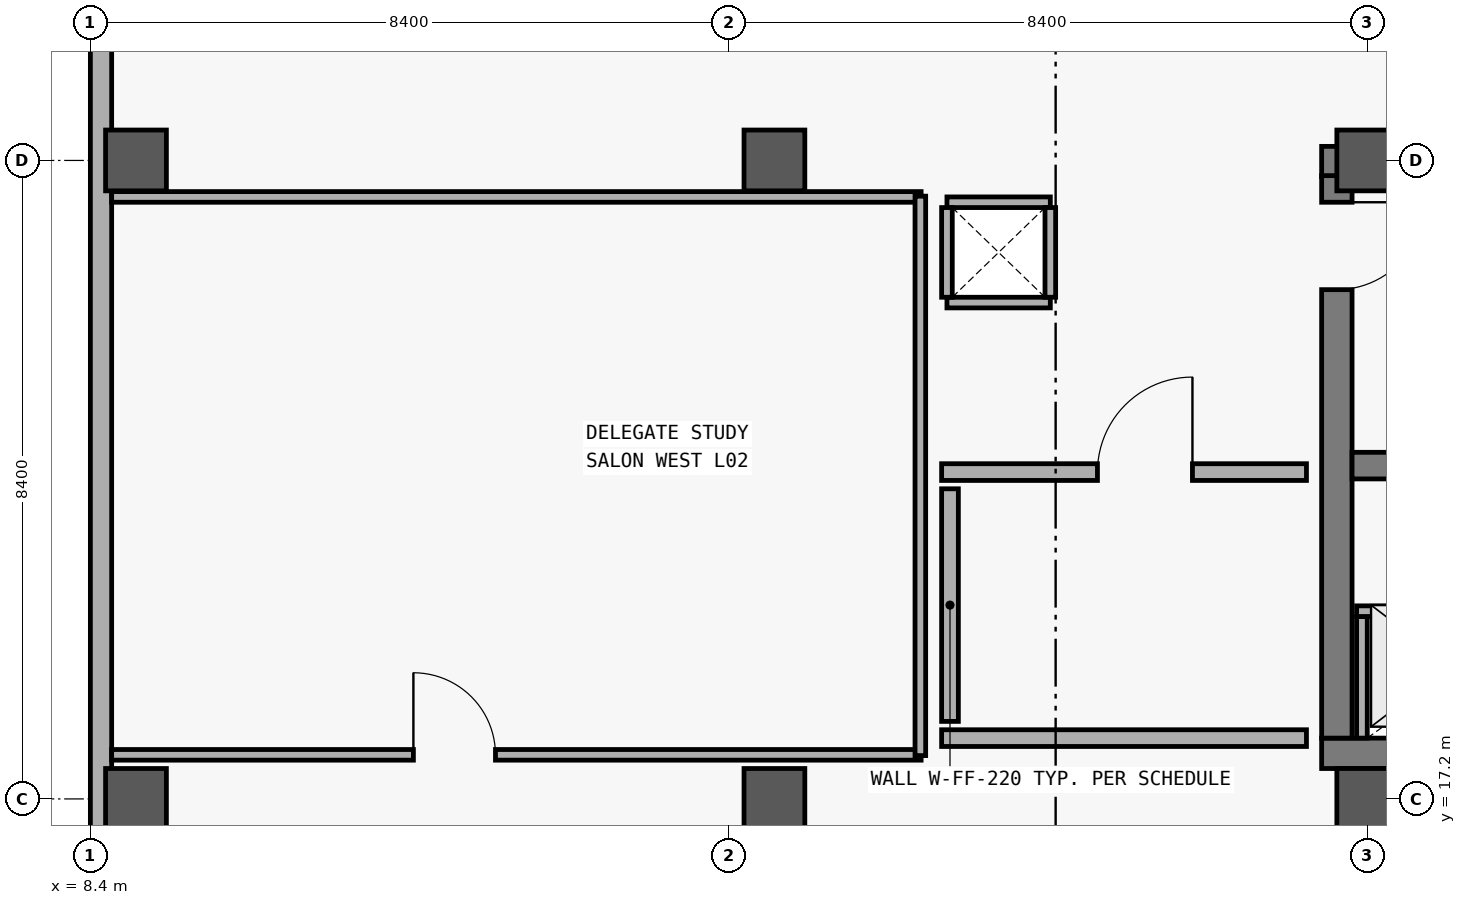
"""IFC4 building model, lengths in metres.
Left out: names, types, materials, properties, quantities, classifications, styles, units other than length and angle.
Written with IfcOpenShell. Run it as: python <this file> out.ifc"""

import sys

from ifc_helpers import new_model, si_unit, direction, frame, frame_2d, origin, origin_2d, place, context, subcontext, project, spatial, rectangle, extrude, element, fill, save


model = new_model("IFC4")
c1 = context("Model", 3, precision=1e-05, world=origin(), true_north=direction((0.0, 1.0)))
c2 = subcontext(c1, "Body", "Model", "MODEL_VIEW")
j1 = project(units=[si_unit("LENGTHUNIT", "METRE"), si_unit("PLANEANGLEUNIT", "RADIAN")], contexts=[c1])
p1 = place(None, origin())
s1 = spatial("IfcSite", under=j1, at=p1, CompositionType="ELEMENT")
p2 = place(p1, origin())
s2 = spatial("IfcBuilding", under=s1, at=p2, CompositionType="ELEMENT")
p3 = place(p2, frame((0.0, 0.0, 10.8)))
s3 = spatial("IfcBuildingStorey", under=s2, at=p3, CompositionType="ELEMENT", Elevation=10.8)
for number, where, z_axis, x_axis in (
    (1, (9.0, 17.2, 0.0), (0.0, 0.0, 1.0), (1.0, 0.0, 0.0)),
    (2, (9.0, 25.6, 0.0), (0.0, 0.0, 1.0), (1.0, 0.0, 0.0)),
    (3, (17.4, 17.2, 0.0), (0.0, 0.0, 1.0), (1.0, 0.0, 0.0)),
    (4, (17.4, 25.6, 0.0), (0.0, 0.0, 1.0), (1.0, 0.0, 0.0)),
    (5, (25.2, 17.2, 0.0), (0.0, 0.0, 1.0), (1.0, 0.0, 0.0)),
    (6, (25.2, 25.6, 0.0), (0.0, 0.0, 1.0), (1.0, 0.0, 0.0)),
):
    element("IfcColumn", number, at=place(p3, frame(where, z_axis=z_axis, x_axis=x_axis)), inside=s3, PredefinedType="COLUMN", context=c2, shape_type="SweptSolid", body=[
        extrude(rectangle(XDim=0.8, YDim=0.8, at=origin_2d()), origin(), (0.0, 0.0, 1.0), 4.2),
    ])
p4 = place(p3, frame((8.54, 6.0, 0.0), z_axis=(0.0, 0.0, 1.0), x_axis=(0.0, 1.0, 0.0)))
e7 = element("IfcWall", 7, at=p4, inside=s3, PredefinedType="SOLIDWALL", context=c2, shape_type="SweptSolid", body=[
    extrude(rectangle(XDim=28.0, YDim=0.28, at=frame_2d((14.0, 0.0))), origin(), (0.0, 0.0, 1.0), 3.92),
])
p5 = place(p4, frame((4.5, 0.0, 0.95)))
e8 = element("IfcOpeningElement", 8, at=p5, cuts=e7, PredefinedType="OPENING", context=c2, shape_type="SweptSolid", body=[
    extrude(rectangle(XDim=1.6, YDim=1.6, at=frame_2d((0.8, 0.8))), frame((0.0, 0.15, 0.0), z_axis=(0.0, -1.0, 0.0), x_axis=(1.0, 0.0, 0.0)), (0.0, 0.0, 1.0), 0.3),
])
p6 = place(p3, frame((24.6, 17.8, 0.0), z_axis=(0.0, 0.0, 1.0), x_axis=(1.0, 0.0, 0.0)))
e9 = element("IfcWall", 9, at=p6, inside=s3, PredefinedType="SHEAR", context=c2, shape_type="SweptSolid", body=[
    extrude(rectangle(XDim=9.2, YDim=0.4, at=frame_2d((4.6, 0.0))), origin(), (0.0, 0.0, 1.0), 3.92),
])
p7 = place(p6, frame((1.1, 0.0, 0.0)))
e10 = element("IfcOpeningElement", 10, at=p7, cuts=e9, PredefinedType="OPENING", context=c2, shape_type="SweptSolid", body=[
    extrude(rectangle(XDim=1.2, YDim=2.2, at=frame_2d((0.6, 1.1))), frame((0.0, 0.21, 0.0), z_axis=(0.0, -1.0, 0.0), x_axis=(1.0, 0.0, 0.0)), (0.0, 0.0, 1.0), 0.42),
])
p8 = place(p6, frame((3.5, 0.0, 0.0)))
e11 = element("IfcOpeningElement", 11, at=p8, cuts=e9, PredefinedType="OPENING", context=c2, shape_type="SweptSolid", body=[
    extrude(rectangle(XDim=1.1, YDim=2.2, at=frame_2d((0.55, 1.1))), frame((0.0, 0.21, 0.0), z_axis=(0.0, -1.0, 0.0), x_axis=(1.0, 0.0, 0.0)), (0.0, 0.0, 1.0), 0.42),
])
p9 = place(p6, frame((5.9, 0.0, 0.0)))
e12 = element("IfcOpeningElement", 12, at=p9, cuts=e9, PredefinedType="OPENING", context=c2, shape_type="SweptSolid", body=[
    extrude(rectangle(XDim=1.1, YDim=2.2, at=frame_2d((0.55, 1.1))), frame((0.0, 0.21, 0.0), z_axis=(0.0, -1.0, 0.0), x_axis=(1.0, 0.0, 0.0)), (0.0, 0.0, 1.0), 0.42),
])
p10 = place(p3, frame((33.8, 25.585, 0.0), z_axis=(0.0, 0.0, 1.0), x_axis=(-1.0, 0.0, 0.0)))
e13 = element("IfcWall", 13, at=p10, inside=s3, PredefinedType="SHEAR", context=c2, shape_type="SweptSolid", body=[
    extrude(rectangle(XDim=9.2, YDim=0.4, at=frame_2d((4.6, 0.0))), origin(), (0.0, 0.0, 1.0), 3.92),
])
p11 = place(p3, frame((24.8, 25.4, 0.0), z_axis=(0.0, 0.0, 1.0), x_axis=(0.0, -1.0, 0.0)))
e14 = element("IfcWall", 14, at=p11, inside=s3, PredefinedType="SHEAR", context=c2, shape_type="SweptSolid", body=[
    extrude(rectangle(XDim=7.4, YDim=0.4, at=frame_2d((3.7, 0.0))), origin(), (0.0, 0.0, 1.0), 3.92),
])
p12 = place(p11, frame((0.35, 0.0, 0.0)))
e15 = element("IfcOpeningElement", 15, at=p12, cuts=e14, PredefinedType="OPENING", context=c2, shape_type="SweptSolid", body=[
    extrude(rectangle(XDim=1.15, YDim=2.2, at=frame_2d((0.575, 1.1))), frame((0.0, 0.21, 0.0), z_axis=(0.0, -1.0, 0.0), x_axis=(1.0, 0.0, 0.0)), (0.0, 0.0, 1.0), 0.42),
])
p13 = place(p3, frame((25.0, 21.585, 0.0), z_axis=(0.0, 0.0, 1.0), x_axis=(1.0, 0.0, 0.0)))
e16 = element("IfcWall", 16, at=p13, inside=s3, PredefinedType="SHEAR", context=c2, shape_type="SweptSolid", body=[
    extrude(rectangle(XDim=8.4, YDim=0.35, at=frame_2d((4.2, 0.0))), origin(), (0.0, 0.0, 1.0), 3.92),
])
p14 = place(p3, frame((25.13, 18.0, 0.0), z_axis=(0.0, 0.0, 1.0), x_axis=(0.0, 1.0, 0.0)))
e17 = element("IfcWall", 17, at=p14, inside=s3, PredefinedType="PARTITIONING", context=c2, shape_type="SweptSolid", body=[
    extrude(rectangle(XDim=1.6, YDim=0.14, at=frame_2d((0.8, 0.0))), origin(), (0.0, 0.0, 1.0), 3.07),
])
p15 = place(p3, frame((25.06, 19.67, 0.0), z_axis=(0.0, 0.0, 1.0), x_axis=(1.0, 0.0, 0.0)))
e18 = element("IfcWall", 18, at=p15, inside=s3, PredefinedType="PARTITIONING", context=c2, shape_type="SweptSolid", body=[
    extrude(rectangle(XDim=7.18, YDim=0.14, at=frame_2d((3.59, 0.0))), origin(), (0.0, 0.0, 1.0), 3.07),
])
p16 = place(p3, frame((19.6, 18.0, 0.0), z_axis=(0.0, 0.0, 1.0), x_axis=(1.0, 0.0, 0.0)))
e19 = element("IfcWall", 19, at=p16, inside=s3, PredefinedType="SOLIDWALL", context=c2, shape_type="SweptSolid", body=[
    extrude(rectangle(XDim=4.8, YDim=0.22, at=frame_2d((2.4, 0.0))), origin(), (0.0, 0.0, 1.0), 3.07),
])
p17 = place(p3, frame((19.6, 21.5, 0.0), z_axis=(0.0, 0.0, 1.0), x_axis=(1.0, 0.0, 0.0)))
e20 = element("IfcWall", 20, at=p17, inside=s3, PredefinedType="SOLIDWALL", context=c2, shape_type="SweptSolid", body=[
    extrude(rectangle(XDim=4.8, YDim=0.22, at=frame_2d((2.4, 0.0))), origin(), (0.0, 0.0, 1.0), 3.07),
])
p18 = place(p17, frame((2.05, 0.0, 0.0)))
e21 = element("IfcOpeningElement", 21, at=p18, cuts=e20, PredefinedType="OPENING", context=c2, shape_type="SweptSolid", body=[
    extrude(rectangle(XDim=1.25, YDim=2.2, at=frame_2d((0.625, 1.1))), frame((0.0, 0.12, 0.0), z_axis=(0.0, -1.0, 0.0), x_axis=(1.0, 0.0, 0.0)), (0.0, 0.0, 1.0), 0.24),
])
p19 = place(p3, frame((19.71, 18.22, 0.0), z_axis=(0.0, 0.0, 1.0), x_axis=(0.0, 1.0, 0.0)))
e22 = element("IfcWall", 22, at=p19, inside=s3, PredefinedType="SOLIDWALL", context=c2, shape_type="SweptSolid", body=[
    extrude(rectangle(XDim=3.06, YDim=0.22, at=frame_2d((1.53, 0.0))), origin(), (0.0, 0.0, 1.0), 3.07),
])
p20 = place(p3, frame((8.68, 17.78, 0.0), z_axis=(0.0, 0.0, 1.0), x_axis=(1.0, 0.0, 0.0)))
e23 = element("IfcWall", 23, at=p20, inside=s3, PredefinedType="PARTITIONING", context=c2, shape_type="SweptSolid", body=[
    extrude(rectangle(XDim=10.65, YDim=0.14, at=frame_2d((5.325, 0.0))), origin(), (0.0, 0.0, 1.0), 3.02),
])
p21 = place(p20, frame((3.97, 0.0, 0.0)))
e24 = element("IfcOpeningElement", 24, at=p21, cuts=e23, PredefinedType="OPENING", context=c2, shape_type="SweptSolid", body=[
    extrude(rectangle(XDim=1.08, YDim=2.25, at=frame_2d((0.54, 1.125))), frame((0.0, 0.08, 0.0), z_axis=(0.0, -1.0, 0.0), x_axis=(1.0, 0.0, 0.0)), (0.0, 0.0, 1.0), 0.16),
])
p22 = place(p3, frame((8.68, 25.12, 0.0), z_axis=(0.0, 0.0, 1.0), x_axis=(1.0, 0.0, 0.0)))
e25 = element("IfcWall", 25, at=p22, inside=s3, PredefinedType="PARTITIONING", context=c2, shape_type="SweptSolid", body=[
    extrude(rectangle(XDim=10.65, YDim=0.14, at=frame_2d((5.325, 0.0))), origin(), (0.0, 0.0, 1.0), 3.02),
])
p23 = place(p3, frame((19.32, 17.77, 0.0), z_axis=(0.0, 0.0, 1.0), x_axis=(0.0, 1.0, 0.0)))
e26 = element("IfcWall", 26, at=p23, inside=s3, PredefinedType="PARTITIONING", context=c2, shape_type="SweptSolid", body=[
    extrude(rectangle(XDim=7.36, YDim=0.14, at=frame_2d((3.68, 0.0))), origin(), (0.0, 0.0, 1.0), 3.02),
])
for number, where, z_axis, x_axis in (
    (27, (19.67, 23.73, 0.0), (0.0, 0.0, 1.0), (1.0, 0.0, 0.0)),
    (28, (21.03, 25.05, 0.0), (0.0, 0.0, 1.0), (-1.0, 0.0, 0.0)),
):
    element("IfcWall", number, at=place(p3, frame(where, z_axis=z_axis, x_axis=x_axis)), inside=s3, PredefinedType="PARTITIONING", context=c2, shape_type="SweptSolid", body=[
        extrude(rectangle(XDim=1.36, YDim=0.14, at=frame_2d((0.68, 0.0))), origin(), (0.0, 0.0, 1.0), 3.04),
    ])
for number, where, z_axis, x_axis in (
    (29, (19.67, 24.98, 0.0), (0.0, 0.0, 1.0), (0.0, -1.0, 0.0)),
    (30, (21.03, 23.8, 0.0), (0.0, 0.0, 1.0), (0.0, 1.0, 0.0)),
):
    element("IfcWall", number, at=place(p3, frame(where, z_axis=z_axis, x_axis=x_axis)), inside=s3, PredefinedType="PARTITIONING", context=c2, shape_type="SweptSolid", body=[
        extrude(rectangle(XDim=1.18, YDim=0.14, at=frame_2d((0.59, 0.0))), origin(), (0.0, 0.0, 1.0), 3.04),
    ])
p24 = place(p12, origin())
e31 = element("IfcDoor", 31, at=p24, inside=s3, OperationType="SINGLE_SWING_LEFT", PredefinedType="DOOR", context=c2, shape_type="SweptSolid", body=[
    extrude(rectangle(XDim=1.15, YDim=2.2, at=frame_2d((0.575, 1.1))), frame((0.0, 0.025, 0.0), z_axis=(0.0, -1.0, 0.0), x_axis=(1.0, 0.0, 0.0)), (0.0, 0.0, 1.0), 0.05),
])
fill(e15, e31)
p25 = place(p18, origin())
e32 = element("IfcDoor", 32, at=p25, inside=s3, OperationType="SINGLE_SWING_RIGHT", PredefinedType="DOOR", context=c2, shape_type="SweptSolid", body=[
    extrude(rectangle(XDim=1.25, YDim=2.2, at=frame_2d((0.625, 1.1))), frame((0.0, 0.025, 0.0), z_axis=(0.0, -1.0, 0.0), x_axis=(1.0, 0.0, 0.0)), (0.0, 0.0, 1.0), 0.05),
])
fill(e21, e32)
p26 = place(p21, origin())
e33 = element("IfcDoor", 33, at=p26, inside=s3, OperationType="SINGLE_SWING_LEFT", PredefinedType="DOOR", context=c2, shape_type="SweptSolid", body=[
    extrude(rectangle(XDim=1.08, YDim=2.25, at=frame_2d((0.54, 1.125))), frame((0.0, 0.025, 0.0), z_axis=(0.0, -1.0, 0.0), x_axis=(1.0, 0.0, 0.0)), (0.0, 0.0, 1.0), 0.05),
])
fill(e24, e33)
save(model, sys.argv[1])
